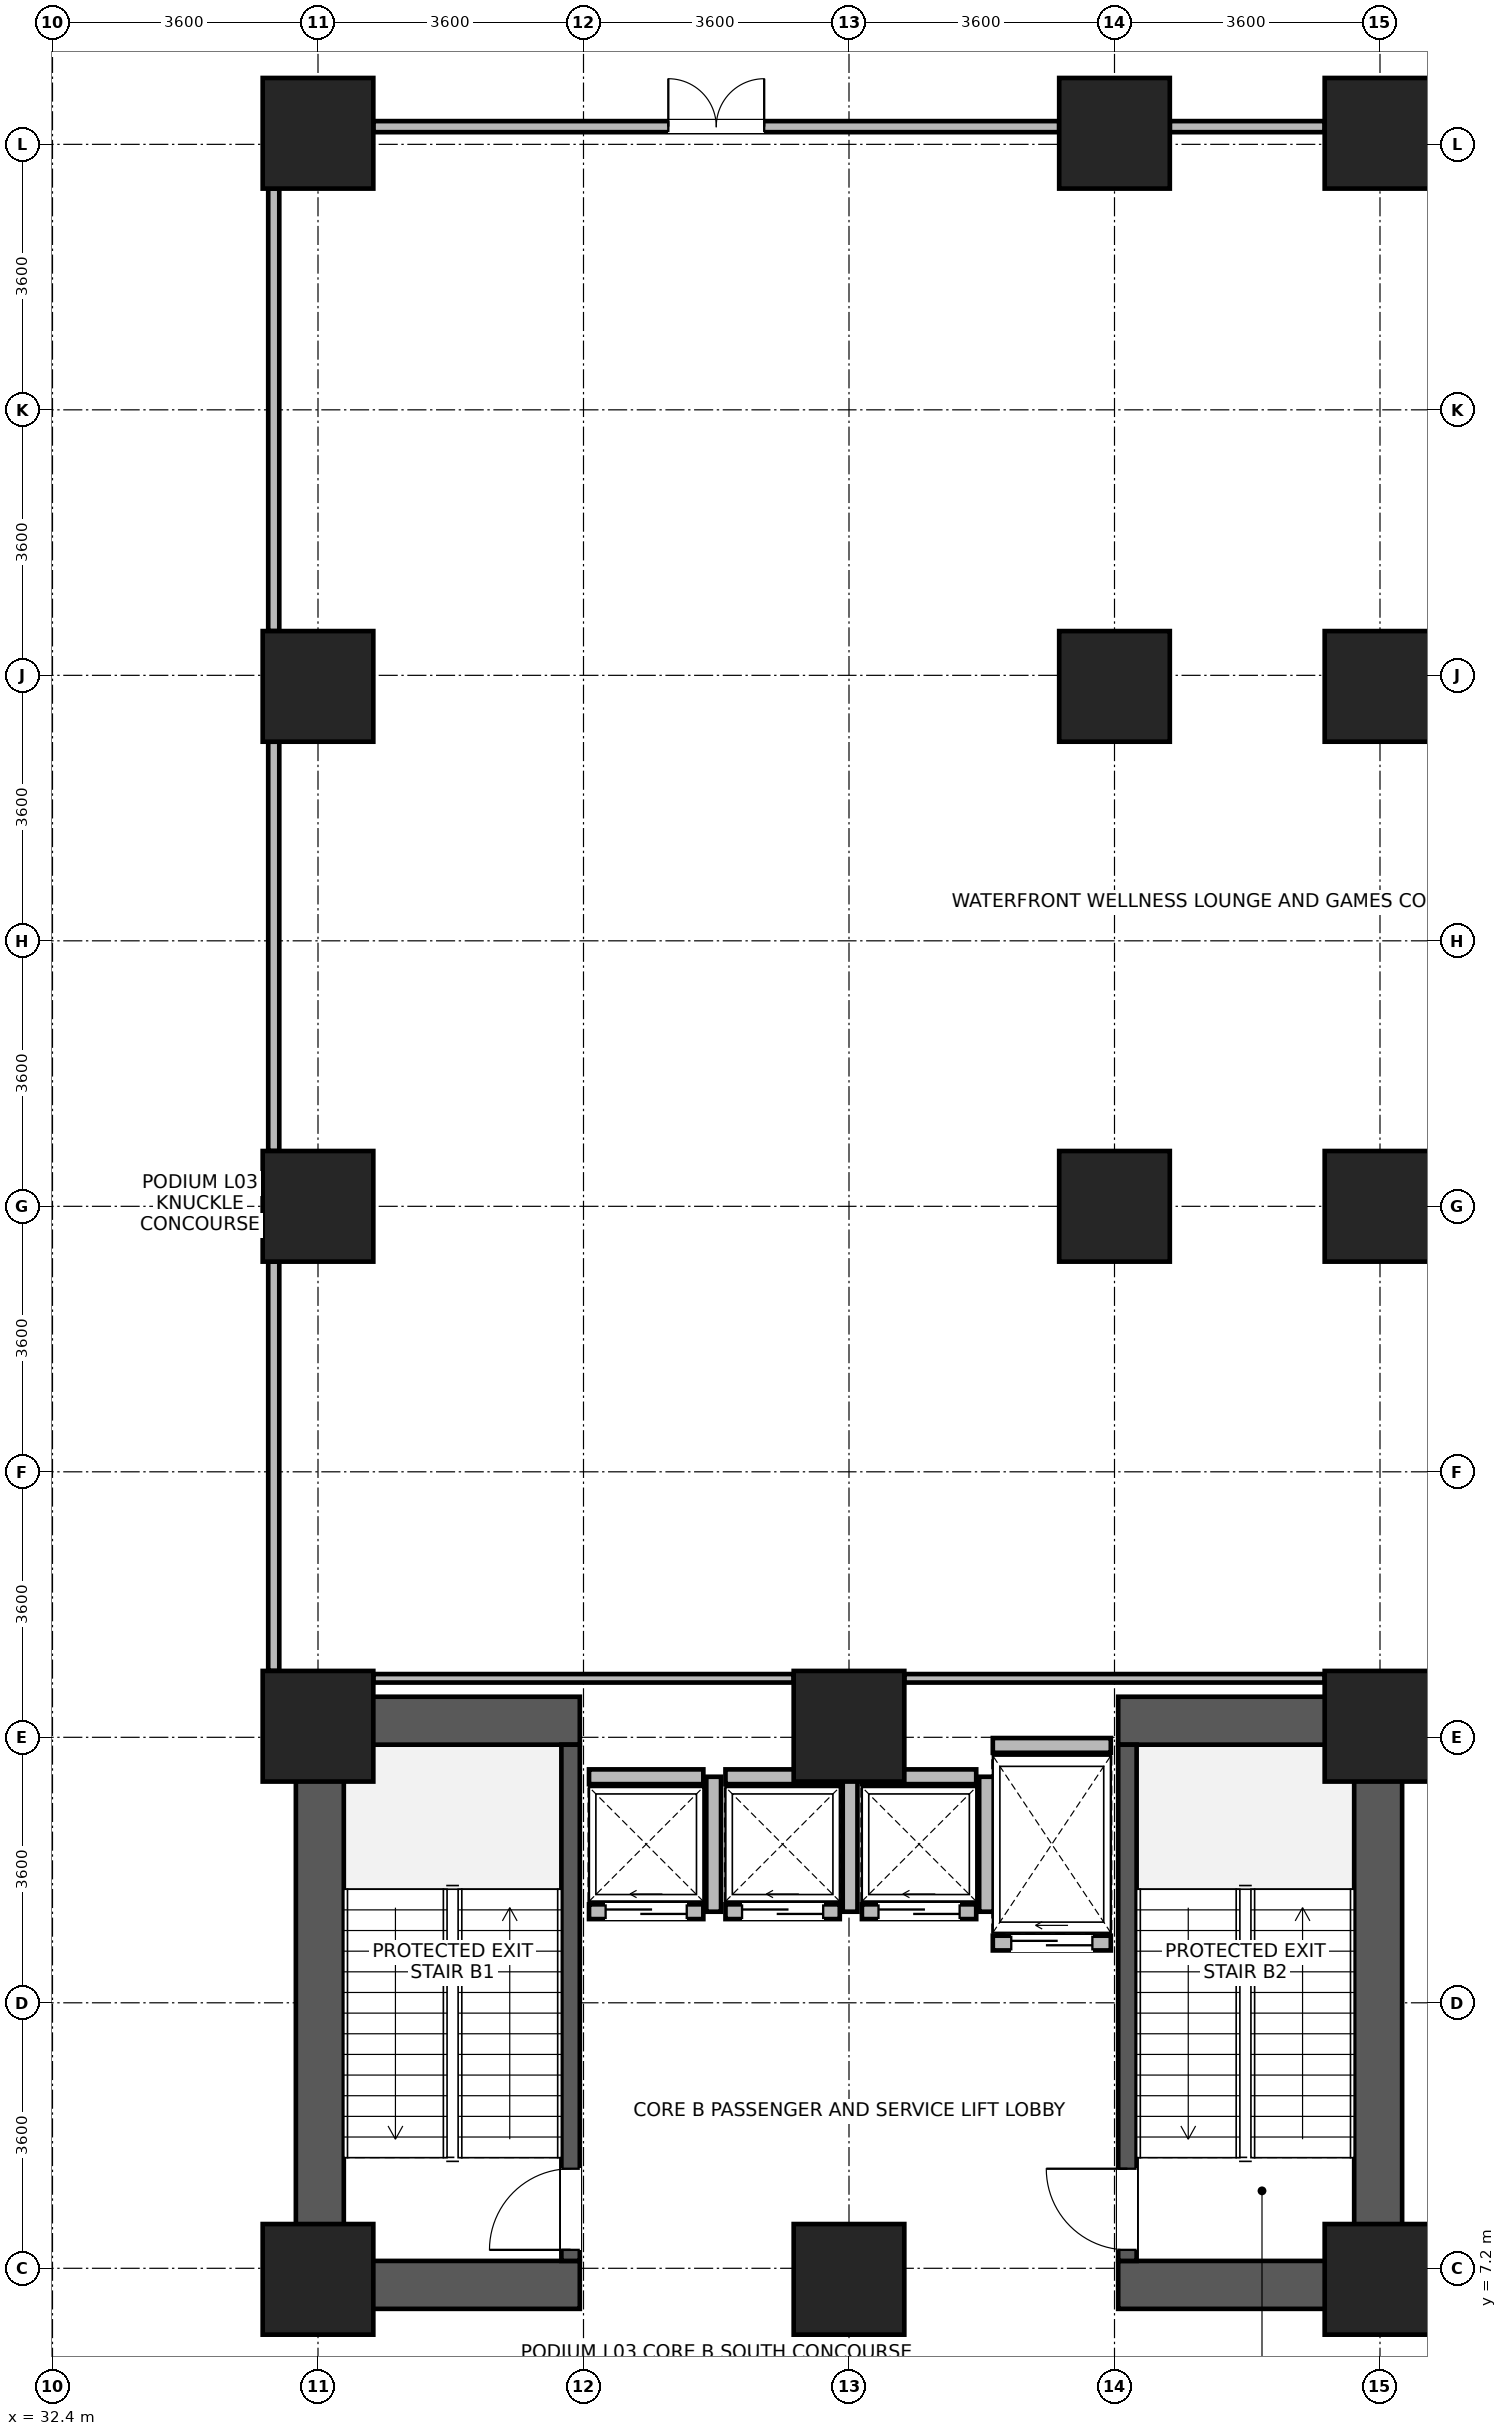
"""IFC4 building model, lengths in metres.
Left out: names, types, materials, properties, quantities, classifications, styles, units other than length and angle.
Written with IfcOpenShell. Run it as: python <this file> out.ifc"""

import sys

from ifc_helpers import new_model, si_unit, direction, frame, frame_2d, origin, origin_2d, place, context, subcontext, project, spatial, rectangle, extrude, source, transform, mapped, element, fill, save


model = new_model("IFC4")
c1 = context("Model", 3, precision=1e-05, world=origin(), true_north=direction((0.0, 1.0)))
c2 = subcontext(c1, "Body", "Model", "MODEL_VIEW")
j1 = project(units=[si_unit("LENGTHUNIT", "METRE"), si_unit("PLANEANGLEUNIT", "RADIAN")], contexts=[c1])
p1 = place(None, origin())
s1 = spatial("IfcSite", under=j1, at=p1, CompositionType="ELEMENT")
p2 = place(p1, origin())
s2 = spatial("IfcBuilding", under=s1, at=p2, CompositionType="ELEMENT")
p3 = place(p2, frame((0.0, 0.0, 15.0)))
s3 = spatial("IfcBuildingStorey", under=s2, at=p3, CompositionType="ELEMENT", Elevation=15.0)
for number, where, z_axis, x_axis in (
    (1, (36.025, 6.65, 0.0), (0.0, 0.0, 1.0), (0.0, 1.0, 0.0)),
    (2, (50.375, 6.65, 0.0), (0.0, 0.0, 1.0), (0.0, 1.0, 0.0)),
):
    element("IfcWall", number, at=place(p3, frame(where, z_axis=z_axis, x_axis=x_axis)), inside=s3, PredefinedType="SHEAR", context=c2, shape_type="SweptSolid", body=[
        extrude(rectangle(XDim=8.3, YDim=0.65, at=frame_2d((4.15, 0.0))), origin(), (0.0, 0.0, 1.0), 4.38),
    ])
for number, where, z_axis, x_axis in (
    (3, (36.35, 6.975, 0.0), (0.0, 0.0, 1.0), (1.0, 0.0, 0.0)),
    (4, (46.85, 6.975, 0.0), (0.0, 0.0, 1.0), (1.0, 0.0, 0.0)),
    (5, (36.35, 14.625, 0.0), (0.0, 0.0, 1.0), (1.0, 0.0, 0.0)),
    (6, (46.85, 14.625, 0.0), (0.0, 0.0, 1.0), (1.0, 0.0, 0.0)),
):
    element("IfcWall", number, at=place(p3, frame(where, z_axis=z_axis, x_axis=x_axis)), inside=s3, PredefinedType="SHEAR", context=c2, shape_type="SweptSolid", body=[
        extrude(rectangle(XDim=3.2, YDim=0.65, at=frame_2d((1.6, 0.0))), origin(), (0.0, 0.0, 1.0), 4.38),
    ])
p4 = place(p3, frame((39.425, 7.3, 0.0), z_axis=(0.0, 0.0, 1.0), x_axis=(0.0, 1.0, 0.0)))
e7 = element("IfcWall", 7, at=p4, inside=s3, PredefinedType="SHEAR", context=c2, shape_type="SweptSolid", body=[
    extrude(rectangle(XDim=7.0, YDim=0.25, at=frame_2d((3.5, 0.0))), origin(), (0.0, 0.0, 1.0), 4.38),
])
p5 = place(p4, frame((0.15, 0.0, 0.0)))
e8 = element("IfcOpeningElement", 8, at=p5, cuts=e7, PredefinedType="OPENING", context=c2, shape_type="SweptSolid", body=[
    extrude(rectangle(XDim=1.1, YDim=2.08, at=frame_2d((0.55, 1.04))), frame((0.0, 0.135, 0.0), z_axis=(0.0, -1.0, 0.0), x_axis=(1.0, 0.0, 0.0)), (0.0, 0.0, 1.0), 0.27),
])
p6 = place(p3, frame((46.975, 7.3, 0.0), z_axis=(0.0, 0.0, 1.0), x_axis=(0.0, 1.0, 0.0)))
e9 = element("IfcWall", 9, at=p6, inside=s3, PredefinedType="SHEAR", context=c2, shape_type="SweptSolid", body=[
    extrude(rectangle(XDim=7.0, YDim=0.25, at=frame_2d((3.5, 0.0))), origin(), (0.0, 0.0, 1.0), 4.38),
])
p7 = place(p6, frame((0.15, 0.0, 0.0)))
e10 = element("IfcOpeningElement", 10, at=p7, cuts=e9, PredefinedType="OPENING", context=c2, shape_type="SweptSolid", body=[
    extrude(rectangle(XDim=1.1, YDim=2.08, at=frame_2d((0.55, 1.04))), frame((0.0, 0.135, 0.0), z_axis=(0.0, -1.0, 0.0), x_axis=(1.0, 0.0, 0.0)), (0.0, 0.0, 1.0), 0.27),
])
m1 = source(origin(), c2, "Body", "SweptSolid", [
    extrude(rectangle(XDim=1.5, YDim=1.5, at=origin_2d()), origin(), (0.0, 0.0, 1.0), 4.8),
])
for number, where, z_axis, x_axis in (
    (11, (36.0, 21.6, 0.0), (0.0, 0.0, 1.0), (1.0, 0.0, 0.0)),
    (12, (36.0, 28.65, 0.0), (0.0, 0.0, 1.0), (1.0, 0.0, 0.0)),
    (13, (36.0, 36.15, 0.0), (0.0, 0.0, 1.0), (1.0, 0.0, 0.0)),
    (14, (46.8, 21.6, 0.0), (0.0, 0.0, 1.0), (1.0, 0.0, 0.0)),
    (15, (46.8, 28.65, 0.0), (0.0, 0.0, 1.0), (1.0, 0.0, 0.0)),
    (16, (46.8, 36.15, 0.0), (0.0, 0.0, 1.0), (1.0, 0.0, 0.0)),
    (17, (36.0, 7.05, 0.0), (0.0, 0.0, 1.0), (1.0, 0.0, 0.0)),
    (18, (36.0, 14.55, 0.0), (0.0, 0.0, 1.0), (1.0, 0.0, 0.0)),
    (19, (43.2, 7.05, 0.0), (0.0, 0.0, 1.0), (1.0, 0.0, 0.0)),
    (20, (43.2, 14.55, 0.0), (0.0, 0.0, 1.0), (1.0, 0.0, 0.0)),
    (21, (50.4, 7.05, 0.0), (0.0, 0.0, 1.0), (1.0, 0.0, 0.0)),
    (22, (50.4, 14.55, 0.0), (0.0, 0.0, 1.0), (1.0, 0.0, 0.0)),
    (23, (50.4, 21.6, 0.0), (0.0, 0.0, 1.0), (1.0, 0.0, 0.0)),
    (24, (50.4, 28.65, 0.0), (0.0, 0.0, 1.0), (1.0, 0.0, 0.0)),
    (25, (50.4, 36.15, 0.0), (0.0, 0.0, 1.0), (1.0, 0.0, 0.0)),
):
    element("IfcColumn", number, at=place(p3, frame(where, z_axis=z_axis, x_axis=x_axis)), inside=s3, PredefinedType="COLUMN", context=c2, shape_type="MappedRepresentation", body=[
        mapped(m1, transform((0.0, 0.0, 0.0), x_axis=(1.0, 0.0, 0.0), y_axis=(0.0, 1.0, 0.0), z_axis=(0.0, 0.0, 1.0), scale=1.0)),
    ])
p8 = place(p3, frame((39.675, 12.035, 0.0), z_axis=(0.0, 0.0, 1.0), x_axis=(1.0, 0.0, 0.0)))
e26 = element("IfcWall", 26, at=p8, inside=s3, PredefinedType="PARTITIONING", context=c2, shape_type="SweptSolid", body=[
    extrude(rectangle(XDim=1.55, YDim=0.2, at=frame_2d((0.775, 0.0))), origin(), (0.0, 0.0, 1.0), 4.36),
])
p9 = place(p8, frame((0.225, 0.0, 0.0)))
e27 = element("IfcOpeningElement", 27, at=p9, cuts=e26, PredefinedType="OPENING", context=c2, shape_type="SweptSolid", body=[
    extrude(rectangle(XDim=1.1, YDim=2.12, at=frame_2d((0.55, 1.06))), frame((0.0, 0.11, 0.0), z_axis=(0.0, -1.0, 0.0), x_axis=(1.0, 0.0, 0.0)), (0.0, 0.0, 1.0), 0.22),
])
p10 = place(p3, frame((39.675, 13.865, 0.0), z_axis=(0.0, 0.0, 1.0), x_axis=(1.0, 0.0, 0.0)))
e28 = element("IfcWall", 28, at=p10, inside=s3, PredefinedType="PARTITIONING", context=c2, shape_type="SweptSolid", body=[
    extrude(rectangle(XDim=1.55, YDim=0.2, at=frame_2d((0.775, 0.0))), origin(), (0.0, 0.0, 1.0), 4.36),
])
p11 = place(p3, frame((41.365, 12.035, 0.0), z_axis=(0.0, 0.0, 1.0), x_axis=(0.0, 1.0, 0.0)))
e29 = element("IfcWall", 29, at=p11, inside=s3, PredefinedType="PARTITIONING", context=c2, shape_type="SweptSolid", body=[
    extrude(rectangle(XDim=1.83, YDim=0.2, at=frame_2d((0.915, 0.0))), origin(), (0.0, 0.0, 1.0), 4.36),
])
p12 = place(p3, frame((41.525, 12.035, 0.0), z_axis=(0.0, 0.0, 1.0), x_axis=(1.0, 0.0, 0.0)))
e30 = element("IfcWall", 30, at=p12, inside=s3, PredefinedType="PARTITIONING", context=c2, shape_type="SweptSolid", body=[
    extrude(rectangle(XDim=1.55, YDim=0.2, at=frame_2d((0.775, 0.0))), origin(), (0.0, 0.0, 1.0), 4.36),
])
p13 = place(p12, frame((0.225, 0.0, 0.0)))
e31 = element("IfcOpeningElement", 31, at=p13, cuts=e30, PredefinedType="OPENING", context=c2, shape_type="SweptSolid", body=[
    extrude(rectangle(XDim=1.1, YDim=2.12, at=frame_2d((0.55, 1.06))), frame((0.0, 0.11, 0.0), z_axis=(0.0, -1.0, 0.0), x_axis=(1.0, 0.0, 0.0)), (0.0, 0.0, 1.0), 0.22),
])
p14 = place(p3, frame((41.525, 13.865, 0.0), z_axis=(0.0, 0.0, 1.0), x_axis=(1.0, 0.0, 0.0)))
e32 = element("IfcWall", 32, at=p14, inside=s3, PredefinedType="PARTITIONING", context=c2, shape_type="SweptSolid", body=[
    extrude(rectangle(XDim=1.55, YDim=0.2, at=frame_2d((0.775, 0.0))), origin(), (0.0, 0.0, 1.0), 4.36),
])
p15 = place(p3, frame((43.215, 12.035, 0.0), z_axis=(0.0, 0.0, 1.0), x_axis=(0.0, 1.0, 0.0)))
e33 = element("IfcWall", 33, at=p15, inside=s3, PredefinedType="PARTITIONING", context=c2, shape_type="SweptSolid", body=[
    extrude(rectangle(XDim=1.83, YDim=0.2, at=frame_2d((0.915, 0.0))), origin(), (0.0, 0.0, 1.0), 4.36),
])
p16 = place(p3, frame((43.375, 12.035, 0.0), z_axis=(0.0, 0.0, 1.0), x_axis=(1.0, 0.0, 0.0)))
e34 = element("IfcWall", 34, at=p16, inside=s3, PredefinedType="PARTITIONING", context=c2, shape_type="SweptSolid", body=[
    extrude(rectangle(XDim=1.55, YDim=0.2, at=frame_2d((0.775, 0.0))), origin(), (0.0, 0.0, 1.0), 4.36),
])
p17 = place(p16, frame((0.225, 0.0, 0.0)))
e35 = element("IfcOpeningElement", 35, at=p17, cuts=e34, PredefinedType="OPENING", context=c2, shape_type="SweptSolid", body=[
    extrude(rectangle(XDim=1.1, YDim=2.12, at=frame_2d((0.55, 1.06))), frame((0.0, 0.11, 0.0), z_axis=(0.0, -1.0, 0.0), x_axis=(1.0, 0.0, 0.0)), (0.0, 0.0, 1.0), 0.22),
])
p18 = place(p3, frame((43.375, 13.865, 0.0), z_axis=(0.0, 0.0, 1.0), x_axis=(1.0, 0.0, 0.0)))
e36 = element("IfcWall", 36, at=p18, inside=s3, PredefinedType="PARTITIONING", context=c2, shape_type="SweptSolid", body=[
    extrude(rectangle(XDim=1.55, YDim=0.2, at=frame_2d((0.775, 0.0))), origin(), (0.0, 0.0, 1.0), 4.36),
])
p19 = place(p3, frame((45.065, 12.035, 0.0), z_axis=(0.0, 0.0, 1.0), x_axis=(0.0, 1.0, 0.0)))
e37 = element("IfcWall", 37, at=p19, inside=s3, PredefinedType="PARTITIONING", context=c2, shape_type="SweptSolid", body=[
    extrude(rectangle(XDim=1.83, YDim=0.2, at=frame_2d((0.915, 0.0))), origin(), (0.0, 0.0, 1.0), 4.36),
])
p20 = place(p3, frame((45.15, 11.61, 0.0), z_axis=(0.0, 0.0, 1.0), x_axis=(1.0, 0.0, 0.0)))
e38 = element("IfcWall", 38, at=p20, inside=s3, PredefinedType="PARTITIONING", context=c2, shape_type="SweptSolid", body=[
    extrude(rectangle(XDim=1.6, YDim=0.2, at=frame_2d((0.8, 0.0))), origin(), (0.0, 0.0, 1.0), 4.36),
])
p21 = place(p20, frame((0.25, 0.0, 0.0)))
e39 = element("IfcOpeningElement", 39, at=p21, cuts=e38, PredefinedType="OPENING", context=c2, shape_type="SweptSolid", body=[
    extrude(rectangle(XDim=1.1, YDim=2.12, at=frame_2d((0.55, 1.06))), frame((0.0, 0.11, 0.0), z_axis=(0.0, -1.0, 0.0), x_axis=(1.0, 0.0, 0.0)), (0.0, 0.0, 1.0), 0.22),
])
p22 = place(p3, frame((45.15, 14.29, 0.0), z_axis=(0.0, 0.0, 1.0), x_axis=(1.0, 0.0, 0.0)))
e40 = element("IfcWall", 40, at=p22, inside=s3, PredefinedType="PARTITIONING", context=c2, shape_type="SweptSolid", body=[
    extrude(rectangle(XDim=1.6, YDim=0.2, at=frame_2d((0.8, 0.0))), origin(), (0.0, 0.0, 1.0), 3.16),
])
p23 = place(p3, frame((36.75, 36.24, 0.0), z_axis=(0.0, 0.0, 1.0), x_axis=(1.0, 0.0, 0.0)))
e41 = element("IfcWall", 41, at=p23, inside=s3, PredefinedType="PARTITIONING", context=c2, shape_type="SweptSolid", body=[
    extrude(rectangle(XDim=9.3, YDim=0.15, at=frame_2d((4.65, 0.0))), origin(), (0.0, 0.0, 1.0), 3.66),
])
p24 = place(p23, frame((4.0, 0.0, 0.0)))
e42 = element("IfcOpeningElement", 42, at=p24, cuts=e41, PredefinedType="OPENING", context=c2, shape_type="SweptSolid", body=[
    extrude(rectangle(XDim=1.3, YDim=2.12, at=frame_2d((0.65, 1.06))), frame((0.0, 0.085, 0.0), z_axis=(0.0, -1.0, 0.0), x_axis=(1.0, 0.0, 0.0)), (0.0, 0.0, 1.0), 0.17),
])
p25 = place(p3, frame((47.55, 36.24, 0.0), z_axis=(0.0, 0.0, 1.0), x_axis=(1.0, 0.0, 0.0)))
e43 = element("IfcWall", 43, at=p25, inside=s3, PredefinedType="PARTITIONING", context=c2, shape_type="SweptSolid", body=[
    extrude(rectangle(XDim=2.1, YDim=0.15, at=frame_2d((1.05, 0.0))), origin(), (0.0, 0.0, 1.0), 3.66),
])
p26 = place(p3, frame((35.4, 15.3, 0.0), z_axis=(0.0, 0.0, 1.0), x_axis=(0.0, 1.0, 0.0)))
e44 = element("IfcWall", 44, at=p26, inside=s3, PredefinedType="PARTITIONING", context=c2, shape_type="SweptSolid", body=[
    extrude(rectangle(XDim=5.55, YDim=0.15, at=frame_2d((2.775, 0.0))), origin(), (0.0, 0.0, 1.0), 4.36),
])
p27 = place(p3, frame((35.4, 22.35, 0.0), z_axis=(0.0, 0.0, 1.0), x_axis=(0.0, 1.0, 0.0)))
e45 = element("IfcWall", 45, at=p27, inside=s3, PredefinedType="PARTITIONING", context=c2, shape_type="SweptSolid", body=[
    extrude(rectangle(XDim=5.55, YDim=0.15, at=frame_2d((2.775, 0.0))), origin(), (0.0, 0.0, 1.0), 4.36),
])
p28 = place(p3, frame((35.4, 29.4, 0.0), z_axis=(0.0, 0.0, 1.0), x_axis=(0.0, 1.0, 0.0)))
e46 = element("IfcWall", 46, at=p28, inside=s3, PredefinedType="PARTITIONING", context=c2, shape_type="SweptSolid", body=[
    extrude(rectangle(XDim=6.0, YDim=0.15, at=frame_2d((3.0, 0.0))), origin(), (0.0, 0.0, 1.0), 4.36),
])
for number, where, z_axis, x_axis in (
    (47, (36.75, 15.2, 0.0), (0.0, 0.0, 1.0), (1.0, 0.0, 0.0)),
    (48, (43.95, 15.2, 0.0), (0.0, 0.0, 1.0), (1.0, 0.0, 0.0)),
):
    element("IfcWall", number, at=place(p3, frame(where, z_axis=z_axis, x_axis=x_axis)), inside=s3, PredefinedType="PARTITIONING", context=c2, shape_type="SweptSolid", body=[
        extrude(rectangle(XDim=5.7, YDim=0.115, at=frame_2d((2.85, 0.0))), origin(), (0.0, 0.0, 1.0), 4.36),
    ])
p29 = place(p5, origin())
e49 = element("IfcDoor", 49, at=p29, inside=s3, OperationType="SINGLE_SWING_LEFT", PredefinedType="DOOR", context=c2, shape_type="SweptSolid", body=[
    extrude(rectangle(XDim=1.1, YDim=2.08, at=frame_2d((0.55, 1.04))), frame((0.0, 0.025, 0.0), z_axis=(0.0, -1.0, 0.0), x_axis=(1.0, 0.0, 0.0)), (0.0, 0.0, 1.0), 0.05),
])
fill(e8, e49)
p30 = place(p7, origin())
e50 = element("IfcDoor", 50, at=p30, inside=s3, OperationType="SINGLE_SWING_RIGHT", PredefinedType="DOOR", context=c2, shape_type="SweptSolid", body=[
    extrude(rectangle(XDim=1.1, YDim=2.08, at=frame_2d((0.55, 1.04))), frame((0.0, 0.025, 0.0), z_axis=(0.0, -1.0, 0.0), x_axis=(1.0, 0.0, 0.0)), (0.0, 0.0, 1.0), 0.05),
])
fill(e10, e50)
p31 = place(p9, origin())
e51 = element("IfcDoor", 51, at=p31, inside=s3, OperationType="SLIDING_TO_LEFT", PredefinedType="DOOR", context=c2, shape_type="SweptSolid", body=[
    extrude(rectangle(XDim=1.1, YDim=2.12, at=frame_2d((0.55, 1.06))), frame((0.0, 0.025, 0.0), z_axis=(0.0, -1.0, 0.0), x_axis=(1.0, 0.0, 0.0)), (0.0, 0.0, 1.0), 0.05),
])
fill(e27, e51)
p32 = place(p13, origin())
e52 = element("IfcDoor", 52, at=p32, inside=s3, OperationType="SLIDING_TO_LEFT", PredefinedType="DOOR", context=c2, shape_type="SweptSolid", body=[
    extrude(rectangle(XDim=1.1, YDim=2.12, at=frame_2d((0.55, 1.06))), frame((0.0, 0.025, 0.0), z_axis=(0.0, -1.0, 0.0), x_axis=(1.0, 0.0, 0.0)), (0.0, 0.0, 1.0), 0.05),
])
fill(e31, e52)
p33 = place(p17, origin())
e53 = element("IfcDoor", 53, at=p33, inside=s3, OperationType="SLIDING_TO_LEFT", PredefinedType="DOOR", context=c2, shape_type="SweptSolid", body=[
    extrude(rectangle(XDim=1.1, YDim=2.12, at=frame_2d((0.55, 1.06))), frame((0.0, 0.025, 0.0), z_axis=(0.0, -1.0, 0.0), x_axis=(1.0, 0.0, 0.0)), (0.0, 0.0, 1.0), 0.05),
])
fill(e35, e53)
p34 = place(p21, origin())
e54 = element("IfcDoor", 54, at=p34, inside=s3, OperationType="SLIDING_TO_LEFT", PredefinedType="DOOR", context=c2, shape_type="SweptSolid", body=[
    extrude(rectangle(XDim=1.1, YDim=2.12, at=frame_2d((0.55, 1.06))), frame((0.0, 0.025, 0.0), z_axis=(0.0, -1.0, 0.0), x_axis=(1.0, 0.0, 0.0)), (0.0, 0.0, 1.0), 0.05),
])
fill(e39, e54)
p35 = place(p24, origin())
e55 = element("IfcDoor", 55, at=p35, inside=s3, OperationType="DOUBLE_DOOR_SINGLE_SWING", PredefinedType="DOOR", context=c2, shape_type="SweptSolid", body=[
    extrude(rectangle(XDim=1.3, YDim=2.12, at=frame_2d((0.65, 1.06))), frame((0.0, 0.025, 0.0), z_axis=(0.0, -1.0, 0.0), x_axis=(1.0, 0.0, 0.0)), (0.0, 0.0, 1.0), 0.05),
])
fill(e42, e55)
save(model, sys.argv[1])
